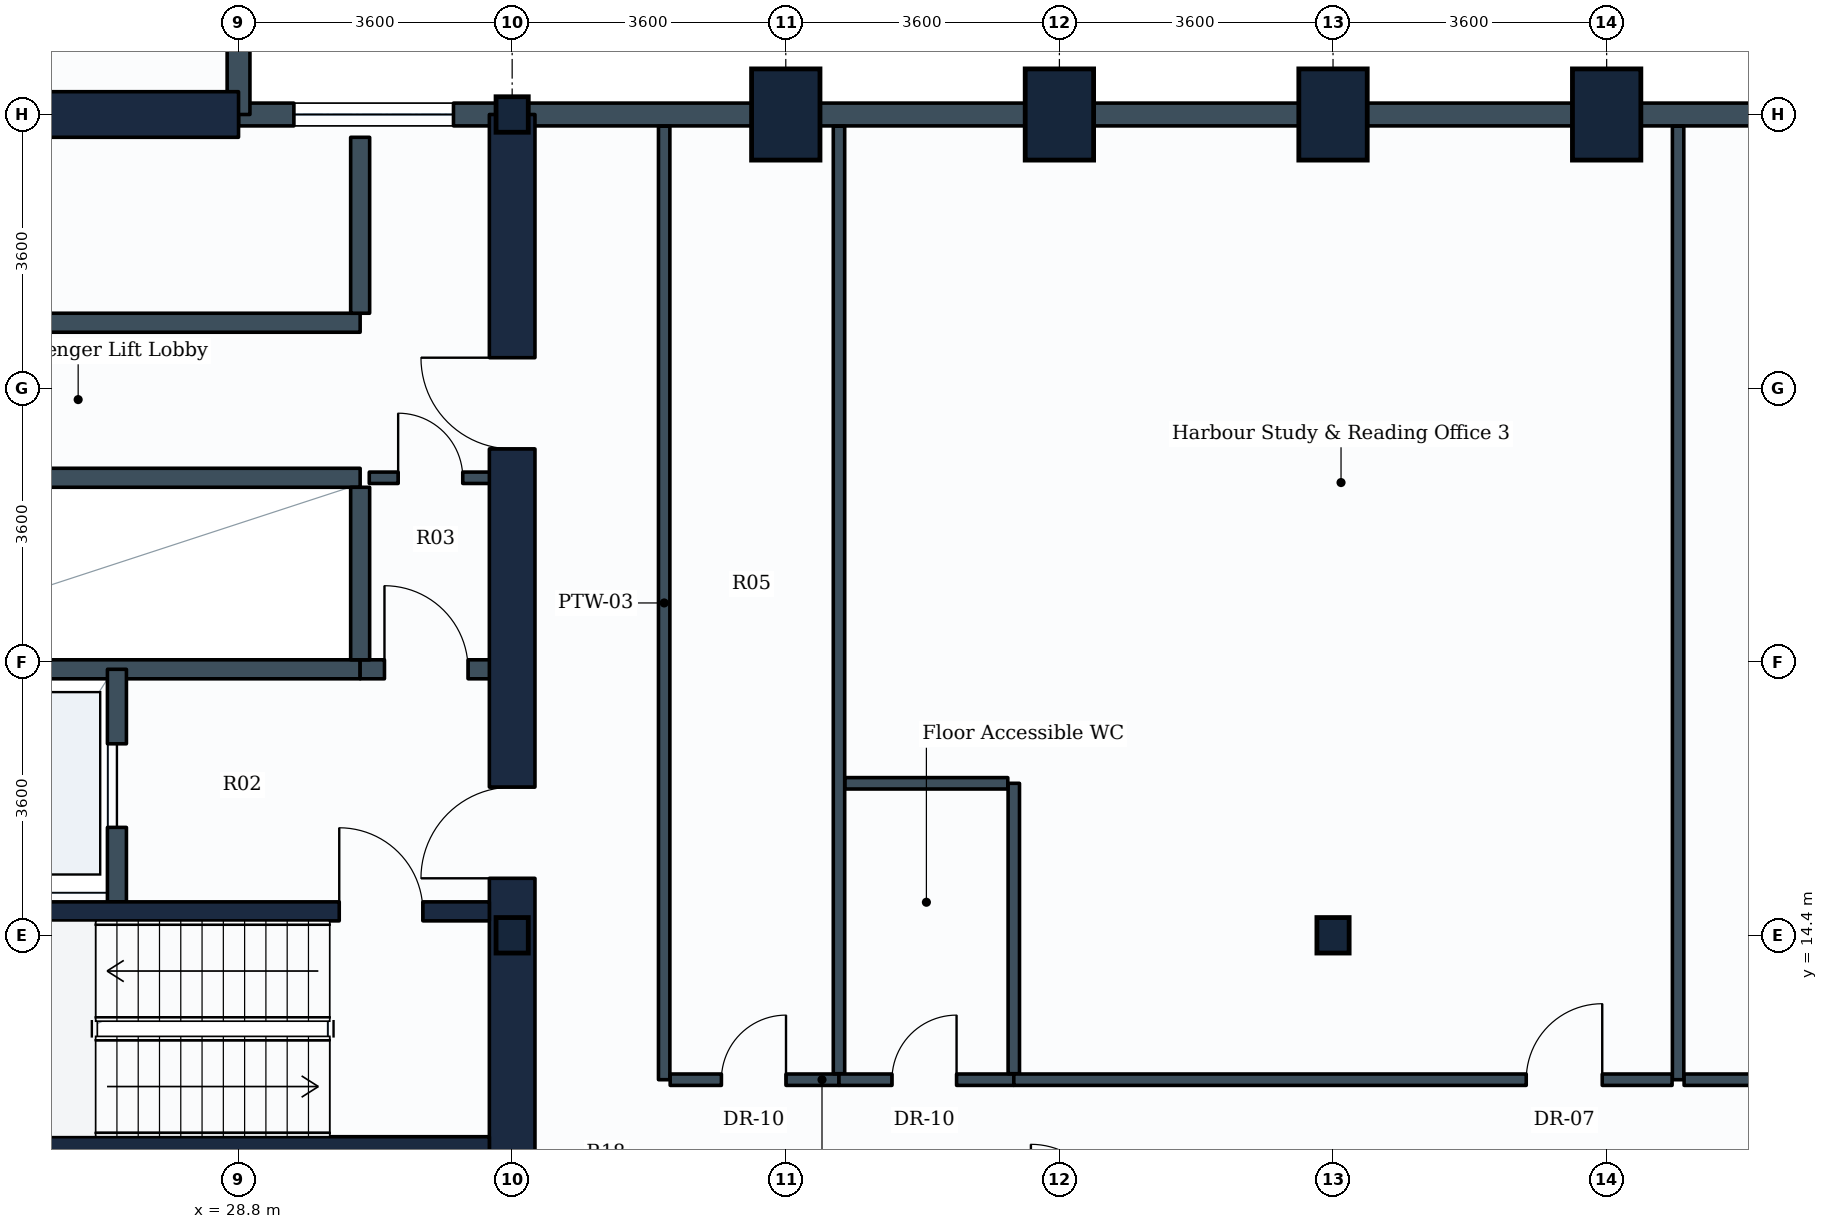
"""IFC4 building model, lengths in metres.
Left out: names, types, materials, properties, quantities, classifications, styles, units other than length and angle.
Written with IfcOpenShell. Run it as: python <this file> out.ifc"""

import sys

from ifc_helpers import new_model, si_unit, direction, frame, frame_2d, origin, origin_2d, place, context, subcontext, project, spatial, rectangle, i_section, extrude, element, fill, save


model = new_model("IFC4")
c1 = context("Model", 3, precision=1e-05, world=origin(), true_north=direction((0.0, 1.0)))
c2 = subcontext(c1, "Body", "Model", "MODEL_VIEW")
j1 = project(units=[si_unit("LENGTHUNIT", "METRE"), si_unit("PLANEANGLEUNIT", "RADIAN")], contexts=[c1])
p1 = place(None, origin())
s1 = spatial("IfcSite", under=j1, at=p1, CompositionType="ELEMENT")
p2 = place(p1, origin())
s2 = spatial("IfcBuilding", under=s1, at=p2, CompositionType="ELEMENT")
p3 = place(p2, frame((0.0, 0.0, 27.9)))
s3 = spatial("IfcBuildingStorey", under=s2, at=p3, CompositionType="ELEMENT", Elevation=27.9)
for number, where, z_axis, x_axis in (
    (1, (32.4, 14.4, 0.0), (0.0, 0.0, 1.0), (1.0, 0.0, 0.0)),
    (2, (32.4, 25.2, 0.0), (0.0, 0.0, 1.0), (1.0, 0.0, 0.0)),
):
    element("IfcColumn", number, at=place(p3, frame(where, z_axis=z_axis, x_axis=x_axis)), inside=s3, PredefinedType="COLUMN", context=c2, shape_type="SweptSolid", body=[
        extrude(i_section(OverallWidth=0.424, OverallDepth=0.467, WebThickness=0.033, FlangeThickness=0.053, FilletRadius=0.015, at=origin_2d()), origin(), (0.0, 0.0, 1.0), 3.9),
    ])
for number, where, z_axis, x_axis in (
    (3, (36.0, 25.2, 0.0), (0.0, 0.0, 1.0), (1.0, 0.0, 0.0)),
    (4, (39.6, 25.2, 0.0), (0.0, 0.0, 1.0), (1.0, 0.0, 0.0)),
):
    element("IfcColumn", number, at=place(p3, frame(where, z_axis=z_axis, x_axis=x_axis)), inside=s3, PredefinedType="COLUMN", context=c2, shape_type="SweptSolid", body=[
        extrude(rectangle(XDim=0.9, YDim=1.2, at=origin_2d()), origin(), (0.0, 0.0, 1.0), 3.9),
    ])
p4 = place(p3, frame((43.2, 14.4, 0.0), z_axis=(0.0, 0.0, 1.0), x_axis=(1.0, 0.0, 0.0)))
e5 = element("IfcColumn", 5, at=p4, inside=s3, PredefinedType="COLUMN", context=c2, shape_type="SweptSolid", body=[
    extrude(i_section(OverallWidth=0.424, OverallDepth=0.467, WebThickness=0.033, FlangeThickness=0.053, FilletRadius=0.015, at=origin_2d()), origin(), (0.0, 0.0, 1.0), 3.9),
])
for number, where, z_axis, x_axis in (
    (6, (43.2, 25.2, 0.0), (0.0, 0.0, 1.0), (1.0, 0.0, 0.0)),
    (7, (46.8, 25.2, 0.0), (0.0, 0.0, 1.0), (1.0, 0.0, 0.0)),
):
    element("IfcColumn", number, at=place(p3, frame(where, z_axis=z_axis, x_axis=x_axis)), inside=s3, PredefinedType="COLUMN", context=c2, shape_type="SweptSolid", body=[
        extrude(rectangle(XDim=0.9, YDim=1.2, at=origin_2d()), origin(), (0.0, 0.0, 1.0), 3.9),
    ])
p5 = place(p3, frame((46.8, 25.2, 0.0), z_axis=(0.0, 0.0, 1.0), x_axis=(1.0, 0.0, 0.0)))
e8 = element("IfcWall", 8, at=p5, inside=s3, PredefinedType="STANDARD", context=c2, shape_type="SweptSolid", body=[
    extrude(rectangle(XDim=3.6, YDim=0.3, at=frame_2d((1.8, 0.0))), origin(), (0.0, 0.0, 1.0), 2.93),
])
p6 = place(p3, frame((43.2, 25.2, 0.0), z_axis=(0.0, 0.0, 1.0), x_axis=(1.0, 0.0, 0.0)))
e9 = element("IfcWall", 9, at=p6, inside=s3, PredefinedType="STANDARD", context=c2, shape_type="SweptSolid", body=[
    extrude(rectangle(XDim=3.6, YDim=0.3, at=frame_2d((1.8, 0.0))), origin(), (0.0, 0.0, 1.0), 2.93),
])
p7 = place(p3, frame((39.6, 25.2, 0.0), z_axis=(0.0, 0.0, 1.0), x_axis=(1.0, 0.0, 0.0)))
e10 = element("IfcWall", 10, at=p7, inside=s3, PredefinedType="STANDARD", context=c2, shape_type="SweptSolid", body=[
    extrude(rectangle(XDim=3.6, YDim=0.3, at=frame_2d((1.8, 0.0))), origin(), (0.0, 0.0, 1.0), 2.93),
])
for number, where, z_axis, x_axis in (
    (11, (36.0, 25.2, 0.0), (0.0, 0.0, 1.0), (1.0, 0.0, 0.0)),
    (12, (32.4, 25.2, 0.0), (0.0, 0.0, 1.0), (1.0, 0.0, 0.0)),
):
    element("IfcWall", number, at=place(p3, frame(where, z_axis=z_axis, x_axis=x_axis)), inside=s3, PredefinedType="STANDARD", context=c2, shape_type="SweptSolid", body=[
        extrude(rectangle(XDim=3.6, YDim=0.3, at=frame_2d((1.8, 0.0))), origin(), (0.0, 0.0, 1.0), 2.93),
    ])
p8 = place(p3, frame((28.8, 25.2, 0.0), z_axis=(0.0, 0.0, 1.0), x_axis=(1.0, 0.0, 0.0)))
e13 = element("IfcWall", 13, at=p8, inside=s3, PredefinedType="STANDARD", context=c2, shape_type="SweptSolid", body=[
    extrude(rectangle(XDim=3.6, YDim=0.3, at=frame_2d((1.8, 0.0))), origin(), (0.0, 0.0, 1.0), 3.635),
])
p9 = place(p8, frame((0.728, 0.0, 0.85)))
e14 = element("IfcOpeningElement", 14, at=p9, cuts=e13, PredefinedType="OPENING", context=c2, shape_type="SweptSolid", body=[
    extrude(rectangle(XDim=2.1, YDim=1.35, at=frame_2d((1.05, 0.675))), frame((0.0, 0.16, 0.0), z_axis=(0.0, -1.0, 0.0), x_axis=(1.0, 0.0, 0.0)), (0.0, 0.0, 1.0), 0.32),
])
p10 = place(p3, frame((28.8, 25.2, 0.0), z_axis=(0.0, 0.0, 1.0), x_axis=(0.0, 1.0, 0.0)))
e15 = element("IfcWall", 15, at=p10, inside=s3, PredefinedType="STANDARD", context=c2, shape_type="SweptSolid", body=[
    extrude(rectangle(XDim=3.6, YDim=0.3, at=frame_2d((1.8, 0.0))), origin(), (0.0, 0.0, 1.0), 3.14),
])
p11 = place(p3, frame((14.4, 25.2, 0.0), z_axis=(0.0, 0.0, 1.0), x_axis=(1.0, 0.0, 0.0)))
e16 = element("IfcWall", 16, at=p11, inside=s3, PredefinedType="SHEAR", context=c2, shape_type="SweptSolid", body=[
    extrude(rectangle(XDim=14.4, YDim=0.6, at=frame_2d((7.2, 0.0))), origin(), (0.0, 0.0, 1.0), 3.65),
])
p12 = place(p3, frame((32.4, 10.8, 0.0), z_axis=(0.0, 0.0, 1.0), x_axis=(0.0, 1.0, 0.0)))
e17 = element("IfcWall", 17, at=p12, inside=s3, PredefinedType="SHEAR", context=c2, shape_type="SweptSolid", body=[
    extrude(rectangle(XDim=14.4, YDim=0.6, at=frame_2d((7.2, 0.0))), origin(), (0.0, 0.0, 1.0), 3.65),
])
p13 = place(p12, frame((4.35, 0.0, 0.0)))
e18 = element("IfcOpeningElement", 18, at=p13, cuts=e17, PredefinedType="OPENING", context=c2, shape_type="SweptSolid", body=[
    extrude(rectangle(XDim=1.2, YDim=2.1, at=frame_2d((0.6, 1.05))), frame((0.0, 0.31, 0.0), z_axis=(0.0, -1.0, 0.0), x_axis=(1.0, 0.0, 0.0)), (0.0, 0.0, 1.0), 0.62),
])
p14 = place(p12, frame((10.0, 0.0, 0.0)))
e19 = element("IfcOpeningElement", 19, at=p14, cuts=e17, PredefinedType="OPENING", context=c2, shape_type="SweptSolid", body=[
    extrude(rectangle(XDim=1.2, YDim=2.1, at=frame_2d((0.6, 1.05))), frame((0.0, 0.31, 0.0), z_axis=(0.0, -1.0, 0.0), x_axis=(1.0, 0.0, 0.0)), (0.0, 0.0, 1.0), 0.62),
])
p15 = place(p3, frame((23.35, 11.625, 0.0), z_axis=(0.0, 0.0, 1.0), x_axis=(1.0, 0.0, 0.0)))
e20 = element("IfcWall", 20, at=p15, inside=s3, PredefinedType="SHEAR", context=c2, shape_type="SweptSolid", body=[
    extrude(rectangle(XDim=8.75, YDim=0.25, at=frame_2d((4.375, 0.0))), origin(), (0.0, 0.0, 1.0), 3.65),
])
p16 = place(p3, frame((23.35, 14.715, 0.0), z_axis=(0.0, 0.0, 1.0), x_axis=(1.0, 0.0, 0.0)))
e21 = element("IfcWall", 21, at=p16, inside=s3, PredefinedType="SHEAR", context=c2, shape_type="SweptSolid", body=[
    extrude(rectangle(XDim=8.75, YDim=0.25, at=frame_2d((4.375, 0.0))), origin(), (0.0, 0.0, 1.0), 3.65),
])
p17 = place(p16, frame((6.775, 0.0, 0.0)))
e22 = element("IfcOpeningElement", 22, at=p17, cuts=e21, PredefinedType="OPENING", context=c2, shape_type="SweptSolid", body=[
    extrude(rectangle(XDim=1.1, YDim=2.1, at=frame_2d((0.55, 1.05))), frame((0.0, 0.135, 0.0), z_axis=(0.0, -1.0, 0.0), x_axis=(1.0, 0.0, 0.0)), (0.0, 0.0, 1.0), 0.27),
])
p18 = place(p3, frame((21.88, 17.9, 0.0), z_axis=(0.0, 0.0, 1.0), x_axis=(1.0, 0.0, 0.0)))
e23 = element("IfcWall", 23, at=p18, inside=s3, PredefinedType="PARTITIONING", context=c2, shape_type="SweptSolid", body=[
    extrude(rectangle(XDim=8.52, YDim=0.25, at=frame_2d((4.26, 0.0))), origin(), (0.0, 0.0, 1.0), 3.635),
])
p19 = place(p3, frame((30.4, 17.9, 0.0), z_axis=(0.0, 0.0, 1.0), x_axis=(1.0, 0.0, 0.0)))
e24 = element("IfcWall", 24, at=p19, inside=s3, PredefinedType="PARTITIONING", context=c2, shape_type="SweptSolid", body=[
    extrude(rectangle(XDim=1.75, YDim=0.25, at=frame_2d((0.875, 0.0))), origin(), (0.0, 0.0, 1.0), 3.635),
])
p20 = place(p19, frame((0.32, 0.0, 0.0)))
e25 = element("IfcOpeningElement", 25, at=p20, cuts=e24, PredefinedType="OPENING", context=c2, shape_type="SweptSolid", body=[
    extrude(rectangle(XDim=1.1, YDim=2.1, at=frame_2d((0.55, 1.05))), frame((0.0, 0.135, 0.0), z_axis=(0.0, -1.0, 0.0), x_axis=(1.0, 0.0, 0.0)), (0.0, 0.0, 1.0), 0.27),
])
p21 = place(p3, frame((27.2, 14.84, 0.0), z_axis=(0.0, 0.0, 1.0), x_axis=(0.0, 1.0, 0.0)))
e26 = element("IfcWall", 26, at=p21, inside=s3, PredefinedType="PARTITIONING", context=c2, shape_type="SweptSolid", body=[
    extrude(rectangle(XDim=3.06, YDim=0.25, at=frame_2d((1.53, 0.0))), origin(), (0.0, 0.0, 1.0), 3.635),
])
p22 = place(p21, frame((0.98, 0.0, 0.0)))
e27 = element("IfcOpeningElement", 27, at=p22, cuts=e26, PredefinedType="OPENING", context=c2, shape_type="SweptSolid", body=[
    extrude(rectangle(XDim=1.1, YDim=2.1, at=frame_2d((0.55, 1.05))), frame((0.0, 0.135, 0.0), z_axis=(0.0, -1.0, 0.0), x_axis=(1.0, 0.0, 0.0)), (0.0, 0.0, 1.0), 0.27),
])
p23 = place(p3, frame((23.18, 20.42, 0.0), z_axis=(0.0, 0.0, 1.0), x_axis=(1.0, 0.0, 0.0)))
e28 = element("IfcWall", 28, at=p23, inside=s3, PredefinedType="PARTITIONING", context=c2, shape_type="SweptSolid", body=[
    extrude(rectangle(XDim=7.22, YDim=0.25, at=frame_2d((3.61, 0.0))), origin(), (0.0, 0.0, 1.0), 3.635),
])
p24 = place(p3, frame((30.4, 18.025, 0.0), z_axis=(0.0, 0.0, 1.0), x_axis=(0.0, 1.0, 0.0)))
e29 = element("IfcWall", 29, at=p24, inside=s3, PredefinedType="PARTITIONING", context=c2, shape_type="SweptSolid", body=[
    extrude(rectangle(XDim=2.27, YDim=0.25, at=frame_2d((1.135, 0.0))), origin(), (0.0, 0.0, 1.0), 3.635),
])
p25 = place(p3, frame((23.18, 22.46, 0.0), z_axis=(0.0, 0.0, 1.0), x_axis=(1.0, 0.0, 0.0)))
e30 = element("IfcWall", 30, at=p25, inside=s3, PredefinedType="PARTITIONING", context=c2, shape_type="SweptSolid", body=[
    extrude(rectangle(XDim=7.22, YDim=0.25, at=frame_2d((3.61, 0.0))), origin(), (0.0, 0.0, 1.0), 3.635),
])
p26 = place(p3, frame((30.4, 22.585, 0.0), z_axis=(0.0, 0.0, 1.0), x_axis=(0.0, 1.0, 0.0)))
e31 = element("IfcWall", 31, at=p26, inside=s3, PredefinedType="PARTITIONING", context=c2, shape_type="SweptSolid", body=[
    extrude(rectangle(XDim=2.315, YDim=0.25, at=frame_2d((1.157, 0.0))), origin(), (0.0, 0.0, 1.0), 3.635),
])
p27 = place(p3, frame((30.52, 20.42, 0.0), z_axis=(0.0, 0.0, 1.0), x_axis=(1.0, 0.0, 0.0)))
e32 = element("IfcWall", 32, at=p27, inside=s3, PredefinedType="PARTITIONING", context=c2, shape_type="SweptSolid", body=[
    extrude(rectangle(XDim=1.63, YDim=0.15, at=frame_2d((0.815, 0.0))), origin(), (0.0, 0.0, 1.0), 3.635),
])
p28 = place(p27, frame((0.38, 0.0, 0.0)))
e33 = element("IfcOpeningElement", 33, at=p28, cuts=e32, PredefinedType="OPENING", context=c2, shape_type="SweptSolid", body=[
    extrude(rectangle(XDim=0.85, YDim=2.1, at=frame_2d((0.425, 1.05))), frame((0.0, 0.085, 0.0), z_axis=(0.0, -1.0, 0.0), x_axis=(1.0, 0.0, 0.0)), (0.0, 0.0, 1.0), 0.17),
])
p29 = place(p3, frame((34.4, 12.5, 0.0), z_axis=(0.0, 0.0, 1.0), x_axis=(0.0, 1.0, 0.0)))
e34 = element("IfcWall", 34, at=p29, inside=s3, PredefinedType="PARTITIONING", context=c2, shape_type="SweptSolid", body=[
    extrude(rectangle(XDim=12.546, YDim=0.15, at=frame_2d((6.273, 0.0))), origin(), (0.0, 0.0, 1.0), 2.93),
])
p30 = place(p3, frame((34.479, 12.5, 0.0), z_axis=(0.0, 0.0, 1.0), x_axis=(1.0, 0.0, 0.0)))
e35 = element("IfcWall", 35, at=p30, inside=s3, PredefinedType="PARTITIONING", context=c2, shape_type="SweptSolid", body=[
    extrude(rectangle(XDim=2.221, YDim=0.15, at=frame_2d((1.11, 0.0))), origin(), (0.0, 0.0, 1.0), 3.08),
])
p31 = place(p30, frame((0.674, 0.0, 0.0)))
e36 = element("IfcOpeningElement", 36, at=p31, cuts=e35, PredefinedType="OPENING", context=c2, shape_type="SweptSolid", body=[
    extrude(rectangle(XDim=0.85, YDim=2.1, at=frame_2d((0.425, 1.05))), frame((0.0, 0.085, 0.0), z_axis=(0.0, -1.0, 0.0), x_axis=(1.0, 0.0, 0.0)), (0.0, 0.0, 1.0), 0.17),
])
p32 = place(p3, frame((36.7, 12.579, 0.0), z_axis=(0.0, 0.0, 1.0), x_axis=(0.0, 1.0, 0.0)))
e37 = element("IfcWall", 37, at=p32, inside=s3, PredefinedType="PARTITIONING", context=c2, shape_type="SweptSolid", body=[
    extrude(rectangle(XDim=12.467, YDim=0.15, at=frame_2d((6.233, 0.0))), origin(), (0.0, 0.0, 1.0), 2.93),
])
p33 = place(p3, frame((36.7, 12.5, 0.0), z_axis=(0.0, 0.0, 1.0), x_axis=(1.0, 0.0, 0.0)))
e38 = element("IfcWall", 38, at=p33, inside=s3, PredefinedType="PARTITIONING", context=c2, shape_type="SweptSolid", body=[
    extrude(rectangle(XDim=2.3, YDim=0.15, at=frame_2d((1.15, 0.0))), origin(), (0.0, 0.0, 1.0), 3.635),
])
p34 = place(p33, frame((0.697, 0.0, 0.0)))
e39 = element("IfcOpeningElement", 39, at=p34, cuts=e38, PredefinedType="OPENING", context=c2, shape_type="SweptSolid", body=[
    extrude(rectangle(XDim=0.85, YDim=2.1, at=frame_2d((0.425, 1.05))), frame((0.0, 0.085, 0.0), z_axis=(0.0, -1.0, 0.0), x_axis=(1.0, 0.0, 0.0)), (0.0, 0.0, 1.0), 0.17),
])
p35 = place(p3, frame((39.0, 12.579, 0.0), z_axis=(0.0, 0.0, 1.0), x_axis=(0.0, 1.0, 0.0)))
e40 = element("IfcWall", 40, at=p35, inside=s3, PredefinedType="PARTITIONING", context=c2, shape_type="SweptSolid", body=[
    extrude(rectangle(XDim=3.821, YDim=0.15, at=frame_2d((1.91, 0.0))), origin(), (0.0, 0.0, 1.0), 3.08),
])
p36 = place(p3, frame((36.779, 16.4, 0.0), z_axis=(0.0, 0.0, 1.0), x_axis=(1.0, 0.0, 0.0)))
e41 = element("IfcWall", 41, at=p36, inside=s3, PredefinedType="PARTITIONING", context=c2, shape_type="SweptSolid", body=[
    extrude(rectangle(XDim=2.142, YDim=0.15, at=frame_2d((1.071, 0.0))), origin(), (0.0, 0.0, 1.0), 3.635),
])
p37 = place(p3, frame((47.74, 12.5, 0.0), z_axis=(0.0, 0.0, 1.0), x_axis=(0.0, 1.0, 0.0)))
e42 = element("IfcWall", 42, at=p37, inside=s3, PredefinedType="PARTITIONING", context=c2, shape_type="SweptSolid", body=[
    extrude(rectangle(XDim=12.546, YDim=0.15, at=frame_2d((6.273, 0.0))), origin(), (0.0, 0.0, 1.0), 2.93),
])
p38 = place(p3, frame((39.0, 12.5, 0.0), z_axis=(0.0, 0.0, 1.0), x_axis=(1.0, 0.0, 0.0)))
e43 = element("IfcWall", 43, at=p38, inside=s3, PredefinedType="PARTITIONING", context=c2, shape_type="SweptSolid", body=[
    extrude(rectangle(XDim=8.661, YDim=0.15, at=frame_2d((4.331, 0.0))), origin(), (0.0, 0.0, 1.0), 3.04),
])
p39 = place(p38, frame((6.742, 0.0, 0.0)))
e44 = element("IfcOpeningElement", 44, at=p39, cuts=e43, PredefinedType="OPENING", context=c2, shape_type="SweptSolid", body=[
    extrude(rectangle(XDim=1.0, YDim=2.1, at=frame_2d((0.5, 1.05))), frame((0.0, 0.085, 0.0), z_axis=(0.0, -1.0, 0.0), x_axis=(1.0, 0.0, 0.0)), (0.0, 0.0, 1.0), 0.17),
])
p40 = place(p3, frame((47.819, 12.5, 0.0), z_axis=(0.0, 0.0, 1.0), x_axis=(1.0, 0.0, 0.0)))
e45 = element("IfcWall", 45, at=p40, inside=s3, PredefinedType="PARTITIONING", context=c2, shape_type="SweptSolid", body=[
    extrude(rectangle(XDim=7.981, YDim=0.15, at=frame_2d((3.99, 0.0))), origin(), (0.0, 0.0, 1.0), 3.04),
])
p41 = place(p40, frame((5.115, 0.0, 0.0)))
e46 = element("IfcOpeningElement", 46, at=p41, cuts=e45, PredefinedType="OPENING", context=c2, shape_type="SweptSolid", body=[
    extrude(rectangle(XDim=1.0, YDim=2.1, at=frame_2d((0.5, 1.05))), frame((0.0, 0.085, 0.0), z_axis=(0.0, -1.0, 0.0), x_axis=(1.0, 0.0, 0.0)), (0.0, 0.0, 1.0), 0.17),
])
p42 = place(p9, origin())
e47 = element("IfcWindow", 47, at=p42, inside=s3, PartitioningType="SINGLE_PANEL", PredefinedType="WINDOW", context=c2, shape_type="SweptSolid", body=[
    extrude(rectangle(XDim=2.1, YDim=1.35, at=frame_2d((1.05, 0.675))), frame((0.0, 0.03, 0.0), z_axis=(0.0, -1.0, 0.0), x_axis=(1.0, 0.0, 0.0)), (0.0, 0.0, 1.0), 0.06),
])
fill(e14, e47)
p43 = place(p17, origin())
e48 = element("IfcDoor", 48, at=p43, inside=s3, OperationType="SINGLE_SWING_LEFT", PredefinedType="DOOR", context=c2, shape_type="SweptSolid", body=[
    extrude(rectangle(XDim=1.1, YDim=2.1, at=frame_2d((0.55, 1.05))), frame((0.0, 0.025, 0.0), z_axis=(0.0, -1.0, 0.0), x_axis=(1.0, 0.0, 0.0)), (0.0, 0.0, 1.0), 0.05),
])
fill(e22, e48)
p44 = place(p22, origin())
e49 = element("IfcDoor", 49, at=p44, inside=s3, OperationType="SLIDING_TO_LEFT", PredefinedType="DOOR", context=c2, shape_type="SweptSolid", body=[
    extrude(rectangle(XDim=1.1, YDim=2.1, at=frame_2d((0.55, 1.05))), frame((0.0, 0.025, 0.0), z_axis=(0.0, -1.0, 0.0), x_axis=(1.0, 0.0, 0.0)), (0.0, 0.0, 1.0), 0.05),
])
fill(e27, e49)
p45 = place(p13, origin())
e50 = element("IfcDoor", 50, at=p45, inside=s3, OperationType="SINGLE_SWING_LEFT", PredefinedType="DOOR", context=c2, shape_type="SweptSolid", body=[
    extrude(rectangle(XDim=1.2, YDim=2.1, at=frame_2d((0.6, 1.05))), frame((0.0, 0.025, 0.0), z_axis=(0.0, -1.0, 0.0), x_axis=(1.0, 0.0, 0.0)), (0.0, 0.0, 1.0), 0.05),
])
fill(e18, e50)
p46 = place(p20, origin())
e51 = element("IfcDoor", 51, at=p46, inside=s3, OperationType="SINGLE_SWING_LEFT", PredefinedType="DOOR", context=c2, shape_type="SweptSolid", body=[
    extrude(rectangle(XDim=1.1, YDim=2.1, at=frame_2d((0.55, 1.05))), frame((0.0, 0.025, 0.0), z_axis=(0.0, -1.0, 0.0), x_axis=(1.0, 0.0, 0.0)), (0.0, 0.0, 1.0), 0.05),
])
fill(e25, e51)
p47 = place(p14, origin())
e52 = element("IfcDoor", 52, at=p47, inside=s3, OperationType="SINGLE_SWING_RIGHT", PredefinedType="DOOR", context=c2, shape_type="SweptSolid", body=[
    extrude(rectangle(XDim=1.2, YDim=2.1, at=frame_2d((0.6, 1.05))), frame((0.0, 0.025, 0.0), z_axis=(0.0, -1.0, 0.0), x_axis=(1.0, 0.0, 0.0)), (0.0, 0.0, 1.0), 0.05),
])
fill(e19, e52)
p48 = place(p28, origin())
e53 = element("IfcDoor", 53, at=p48, inside=s3, OperationType="SINGLE_SWING_LEFT", PredefinedType="DOOR", context=c2, shape_type="SweptSolid", body=[
    extrude(rectangle(XDim=0.85, YDim=2.1, at=frame_2d((0.425, 1.05))), frame((0.0, 0.025, 0.0), z_axis=(0.0, -1.0, 0.0), x_axis=(1.0, 0.0, 0.0)), (0.0, 0.0, 1.0), 0.05),
])
fill(e33, e53)
p49 = place(p31, origin())
e54 = element("IfcDoor", 54, at=p49, inside=s3, OperationType="SINGLE_SWING_RIGHT", PredefinedType="DOOR", context=c2, shape_type="SweptSolid", body=[
    extrude(rectangle(XDim=0.85, YDim=2.1, at=frame_2d((0.425, 1.05))), frame((0.0, 0.025, 0.0), z_axis=(0.0, -1.0, 0.0), x_axis=(1.0, 0.0, 0.0)), (0.0, 0.0, 1.0), 0.05),
])
fill(e36, e54)
p50 = place(p34, origin())
e55 = element("IfcDoor", 55, at=p50, inside=s3, OperationType="SINGLE_SWING_RIGHT", PredefinedType="DOOR", context=c2, shape_type="SweptSolid", body=[
    extrude(rectangle(XDim=0.85, YDim=2.1, at=frame_2d((0.425, 1.05))), frame((0.0, 0.025, 0.0), z_axis=(0.0, -1.0, 0.0), x_axis=(1.0, 0.0, 0.0)), (0.0, 0.0, 1.0), 0.05),
])
fill(e39, e55)
p51 = place(p39, origin())
e56 = element("IfcDoor", 56, at=p51, inside=s3, OperationType="SINGLE_SWING_RIGHT", PredefinedType="DOOR", context=c2, shape_type="SweptSolid", body=[
    extrude(rectangle(XDim=1.0, YDim=2.1, at=frame_2d((0.5, 1.05))), frame((0.0, 0.025, 0.0), z_axis=(0.0, -1.0, 0.0), x_axis=(1.0, 0.0, 0.0)), (0.0, 0.0, 1.0), 0.05),
])
fill(e44, e56)
save(model, sys.argv[1])
